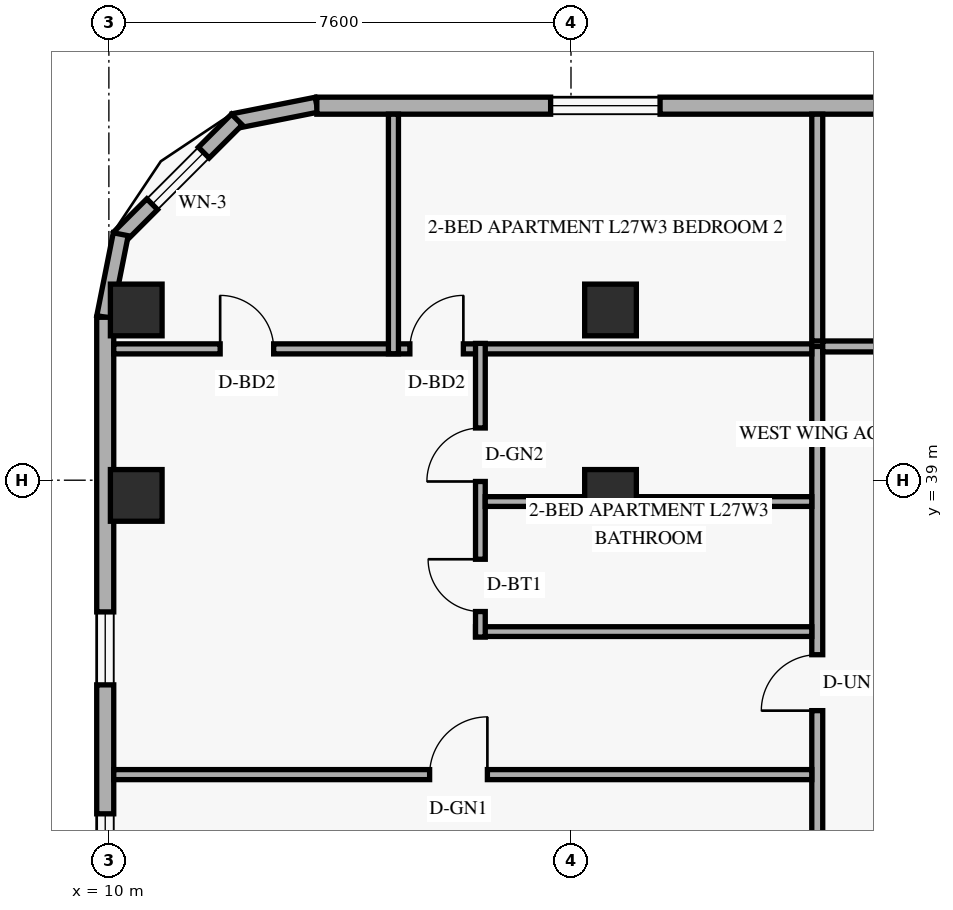
"""IFC4 building model, lengths in metres.
Left out: names, types, materials, properties, quantities, classifications, styles, units other than length and angle.
Written with IfcOpenShell. Run it as: python <this file> out.ifc"""

import sys

from ifc_helpers import new_model, si_unit, direction, frame, frame_2d, origin, origin_2d, place, context, subcontext, project, spatial, rectangle, extrude, element, fill, save


model = new_model("IFC4")
c1 = context("Model", 3, precision=1e-05, world=origin(), true_north=direction((0.0, 1.0)))
c2 = subcontext(c1, "Body", "Model", "MODEL_VIEW")
j1 = project(units=[si_unit("LENGTHUNIT", "METRE"), si_unit("PLANEANGLEUNIT", "RADIAN")], contexts=[c1])
p1 = place(None, origin())
s1 = spatial("IfcSite", under=j1, at=p1, CompositionType="ELEMENT")
p2 = place(p1, origin())
s2 = spatial("IfcBuilding", under=s1, at=p2, CompositionType="ELEMENT")
p3 = place(p2, frame((0.0, 0.0, 106.2)))
s3 = spatial("IfcBuildingStorey", under=s2, at=p3, CompositionType="ELEMENT", Elevation=106.2)
for number, where, z_axis, x_axis in (
    (1, (10.45, 38.75, 0.0), (0.0, 0.0, 1.0), (1.0, 0.0, 0.0)),
    (2, (10.45, 41.8, 0.0), (0.0, 0.0, 1.0), (1.0, 0.0, 0.0)),
    (3, (18.25, 38.75, 0.0), (0.0, 0.0, 1.0), (1.0, 0.0, 0.0)),
    (4, (18.25, 41.8, 0.0), (0.0, 0.0, 1.0), (1.0, 0.0, 0.0)),
):
    element("IfcColumn", number, at=place(p3, frame(where, z_axis=z_axis, x_axis=x_axis)), inside=s3, PredefinedType="COLUMN", context=c2, shape_type="SweptSolid", body=[
        extrude(rectangle(XDim=0.85, YDim=0.85, at=origin_2d()), origin(), (0.0, 0.0, 1.0), 3.6),
    ])
p4 = place(p3, frame((13.417, 45.176, 0.0), z_axis=(0.0, 0.0, 1.0), x_axis=(-0.980809899341, -0.19496651342, 0.0)))
e5 = element("IfcWall", 5, at=p4, inside=s3, PredefinedType="SOLIDWALL", context=c2, shape_type="SweptSolid", body=[
    extrude(rectangle(XDim=1.389, YDim=0.25, at=frame_2d((0.694, 0.0))), origin(), (0.0, 0.0, 1.0), 3.36),
])
p5 = place(p3, frame((12.105, 44.932, 0.0), z_axis=(0.0, 0.0, 1.0), x_axis=(-0.707151344399, -0.707062215165, 0.0)))
e6 = element("IfcWall", 6, at=p5, inside=s3, PredefinedType="SOLIDWALL", context=c2, shape_type="SweptSolid", body=[
    extrude(rectangle(XDim=2.739, YDim=0.25, at=frame_2d((1.37, 0.0))), origin(), (0.0, 0.0, 1.0), 3.36),
])
p6 = place(p5, frame((0.77, 0.0, 0.85)))
e7 = element("IfcOpeningElement", 7, at=p6, cuts=e6, PredefinedType="OPENING", context=c2, shape_type="SweptSolid", body=[
    extrude(rectangle(XDim=1.2, YDim=1.5, at=frame_2d((0.6, 0.75))), frame((0.0, 0.135, 0.0), z_axis=(0.0, -1.0, 0.0), x_axis=(1.0, 0.0, 0.0)), (0.0, 0.0, 1.0), 0.27),
])
p7 = place(p3, frame((10.195, 43.045, 0.0), z_axis=(0.0, 0.0, 1.0), x_axis=(-0.195000137217, -0.980803214965, 0.0)))
e8 = element("IfcWall", 8, at=p7, inside=s3, PredefinedType="SOLIDWALL", context=c2, shape_type="SweptSolid", body=[
    extrude(rectangle(XDim=1.388, YDim=0.25, at=frame_2d((0.694, 0.0))), origin(), (0.0, 0.0, 1.0), 3.36),
])
p8 = place(p3, frame((49.98, 45.16, 0.0), z_axis=(0.0, 0.0, 1.0), x_axis=(-1.0, 0.0, 0.0)))
e9 = element("IfcWall", 9, at=p8, inside=s3, PredefinedType="SOLIDWALL", context=c2, shape_type="SweptSolid", body=[
    extrude(rectangle(XDim=36.56, YDim=0.28, at=frame_2d((18.28, 0.0))), origin(), (0.0, 0.0, 1.0), 3.36),
])
p9 = place(p8, frame((30.915, 0.0, 0.85)))
e10 = element("IfcOpeningElement", 10, at=p9, cuts=e9, PredefinedType="OPENING", context=c2, shape_type="SweptSolid", body=[
    extrude(rectangle(XDim=1.8, YDim=1.6, at=frame_2d((0.9, 0.8))), frame((0.0, 0.15, 0.0), z_axis=(0.0, -1.0, 0.0), x_axis=(1.0, 0.0, 0.0)), (0.0, 0.0, 1.0), 0.3),
])
p10 = place(p8, frame((23.055, 0.0, 0.85)))
e11 = element("IfcOpeningElement", 11, at=p10, cuts=e9, PredefinedType="OPENING", context=c2, shape_type="SweptSolid", body=[
    extrude(rectangle(XDim=1.8, YDim=1.6, at=frame_2d((0.9, 0.8))), frame((0.0, 0.15, 0.0), z_axis=(0.0, -1.0, 0.0), x_axis=(1.0, 0.0, 0.0)), (0.0, 0.0, 1.0), 0.3),
])
p11 = place(p8, frame((16.17, 0.0, 0.85)))
e12 = element("IfcOpeningElement", 12, at=p11, cuts=e9, PredefinedType="OPENING", context=c2, shape_type="SweptSolid", body=[
    extrude(rectangle(XDim=1.8, YDim=1.6, at=frame_2d((0.9, 0.8))), frame((0.0, 0.15, 0.0), z_axis=(0.0, -1.0, 0.0), x_axis=(1.0, 0.0, 0.0)), (0.0, 0.0, 1.0), 0.3),
])
p12 = place(p8, frame((10.565, 0.0, 0.85)))
e13 = element("IfcOpeningElement", 13, at=p12, cuts=e9, PredefinedType="OPENING", context=c2, shape_type="SweptSolid", body=[
    extrude(rectangle(XDim=1.8, YDim=1.6, at=frame_2d((0.9, 0.8))), frame((0.0, 0.15, 0.0), z_axis=(0.0, -1.0, 0.0), x_axis=(1.0, 0.0, 0.0)), (0.0, 0.0, 1.0), 0.3),
])
p13 = place(p8, frame((5.475, 0.0, 0.85)))
e14 = element("IfcOpeningElement", 14, at=p13, cuts=e9, PredefinedType="OPENING", context=c2, shape_type="SweptSolid", body=[
    extrude(rectangle(XDim=1.8, YDim=1.6, at=frame_2d((0.9, 0.8))), frame((0.0, 0.15, 0.0), z_axis=(0.0, -1.0, 0.0), x_axis=(1.0, 0.0, 0.0)), (0.0, 0.0, 1.0), 0.3),
])
p14 = place(p8, frame((2.88, 0.0, 0.85)))
e15 = element("IfcOpeningElement", 15, at=p14, cuts=e9, PredefinedType="OPENING", context=c2, shape_type="SweptSolid", body=[
    extrude(rectangle(XDim=1.2, YDim=1.5, at=frame_2d((0.6, 0.75))), frame((0.0, 0.15, 0.0), z_axis=(0.0, -1.0, 0.0), x_axis=(1.0, 0.0, 0.0)), (0.0, 0.0, 1.0), 0.3),
])
p15 = place(p8, frame((0.39, 0.0, 0.85)))
e16 = element("IfcOpeningElement", 16, at=p15, cuts=e9, PredefinedType="OPENING", context=c2, shape_type="SweptSolid", body=[
    extrude(rectangle(XDim=1.8, YDim=1.6, at=frame_2d((0.9, 0.8))), frame((0.0, 0.15, 0.0), z_axis=(0.0, -1.0, 0.0), x_axis=(1.0, 0.0, 0.0)), (0.0, 0.0, 1.0), 0.3),
])
p16 = place(p3, frame((9.94, 41.68, 0.0), z_axis=(0.0, 0.0, 1.0), x_axis=(0.0, -1.0, 0.0)))
e17 = element("IfcWall", 17, at=p16, inside=s3, PredefinedType="SOLIDWALL", context=c2, shape_type="SweptSolid", body=[
    extrude(rectangle(XDim=35.36, YDim=0.28, at=frame_2d((17.68, 0.0))), origin(), (0.0, 0.0, 1.0), 3.36),
])
p17 = place(p16, frame((28.991, 0.0, 0.85)))
e18 = element("IfcOpeningElement", 18, at=p17, cuts=e17, PredefinedType="OPENING", context=c2, shape_type="SweptSolid", body=[
    extrude(rectangle(XDim=1.2, YDim=1.5, at=frame_2d((0.6, 0.75))), frame((0.0, 0.15, 0.0), z_axis=(0.0, -1.0, 0.0), x_axis=(1.0, 0.0, 0.0)), (0.0, 0.0, 1.0), 0.3),
])
p18 = place(p16, frame((25.281, 0.0, 0.85)))
e19 = element("IfcOpeningElement", 19, at=p18, cuts=e17, PredefinedType="OPENING", context=c2, shape_type="SweptSolid", body=[
    extrude(rectangle(XDim=1.2, YDim=1.5, at=frame_2d((0.6, 0.75))), frame((0.0, 0.15, 0.0), z_axis=(0.0, -1.0, 0.0), x_axis=(1.0, 0.0, 0.0)), (0.0, 0.0, 1.0), 0.3),
])
p19 = place(p16, frame((20.548, 0.0, 0.85)))
e20 = element("IfcOpeningElement", 20, at=p19, cuts=e17, PredefinedType="OPENING", context=c2, shape_type="SweptSolid", body=[
    extrude(rectangle(XDim=1.2, YDim=1.5, at=frame_2d((0.6, 0.75))), frame((0.0, 0.15, 0.0), z_axis=(0.0, -1.0, 0.0), x_axis=(1.0, 0.0, 0.0)), (0.0, 0.0, 1.0), 0.3),
])
p20 = place(p16, frame((14.663, 0.0, 0.85)))
e21 = element("IfcOpeningElement", 21, at=p20, cuts=e17, PredefinedType="OPENING", context=c2, shape_type="SweptSolid", body=[
    extrude(rectangle(XDim=1.2, YDim=1.5, at=frame_2d((0.6, 0.75))), frame((0.0, 0.15, 0.0), z_axis=(0.0, -1.0, 0.0), x_axis=(1.0, 0.0, 0.0)), (0.0, 0.0, 1.0), 0.3),
])
p21 = place(p16, frame((8.167, 0.0, 0.85)))
e22 = element("IfcOpeningElement", 22, at=p21, cuts=e17, PredefinedType="OPENING", context=c2, shape_type="SweptSolid", body=[
    extrude(rectangle(XDim=1.2, YDim=1.5, at=frame_2d((0.6, 0.75))), frame((0.0, 0.15, 0.0), z_axis=(0.0, -1.0, 0.0), x_axis=(1.0, 0.0, 0.0)), (0.0, 0.0, 1.0), 0.3),
])
p22 = place(p16, frame((4.846, 0.0, 0.85)))
e23 = element("IfcOpeningElement", 23, at=p22, cuts=e17, PredefinedType="OPENING", context=c2, shape_type="SweptSolid", body=[
    extrude(rectangle(XDim=1.2, YDim=1.5, at=frame_2d((0.6, 0.75))), frame((0.0, 0.15, 0.0), z_axis=(0.0, -1.0, 0.0), x_axis=(1.0, 0.0, 0.0)), (0.0, 0.0, 1.0), 0.3),
])
p23 = place(p3, frame((21.65, 6.8, 0.0), z_axis=(0.0, 0.0, 1.0), x_axis=(0.0, 1.0, 0.0)))
e24 = element("IfcWall", 24, at=p23, inside=s3, PredefinedType="STANDARD", context=c2, shape_type="SweptSolid", body=[
    extrude(rectangle(XDim=34.4, YDim=0.18, at=frame_2d((17.2, 0.0))), origin(), (0.0, 0.0, 1.0), 2.731),
])
p24 = place(p23, frame((4.785, 0.0, 0.0)))
e25 = element("IfcOpeningElement", 25, at=p24, cuts=e24, PredefinedType="OPENING", context=c2, shape_type="SweptSolid", body=[
    extrude(rectangle(XDim=0.92, YDim=2.15, at=frame_2d((0.46, 1.075))), frame((0.0, 0.1, 0.0), z_axis=(0.0, -1.0, 0.0), x_axis=(1.0, 0.0, 0.0)), (0.0, 0.0, 1.0), 0.2),
])
p25 = place(p23, frame((15.384, 0.0, 0.0)))
e26 = element("IfcOpeningElement", 26, at=p25, cuts=e24, PredefinedType="OPENING", context=c2, shape_type="SweptSolid", body=[
    extrude(rectangle(XDim=0.92, YDim=2.15, at=frame_2d((0.46, 1.075))), frame((0.0, 0.1, 0.0), z_axis=(0.0, -1.0, 0.0), x_axis=(1.0, 0.0, 0.0)), (0.0, 0.0, 1.0), 0.2),
])
p26 = place(p23, frame((28.41, 0.0, 0.0)))
e27 = element("IfcOpeningElement", 27, at=p26, cuts=e24, PredefinedType="OPENING", context=c2, shape_type="SweptSolid", body=[
    extrude(rectangle(XDim=0.92, YDim=2.15, at=frame_2d((0.46, 1.075))), frame((0.0, 0.1, 0.0), z_axis=(0.0, -1.0, 0.0), x_axis=(1.0, 0.0, 0.0)), (0.0, 0.0, 1.0), 0.2),
])
p27 = place(p3, frame((21.74, 41.2, 0.0), z_axis=(0.0, 0.0, 1.0), x_axis=(1.0, 0.0, 0.0)))
e28 = element("IfcWall", 28, at=p27, inside=s3, PredefinedType="STANDARD", context=c2, shape_type="SweptSolid", body=[
    extrude(rectangle(XDim=13.68, YDim=0.18, at=frame_2d((6.84, 0.0))), origin(), (0.0, 0.0, 1.0), 2.731),
])
p28 = place(p27, frame((3.09, 0.0, 0.0)))
e29 = element("IfcOpeningElement", 29, at=p28, cuts=e28, PredefinedType="OPENING", context=c2, shape_type="SweptSolid", body=[
    extrude(rectangle(XDim=0.95, YDim=2.15, at=frame_2d((0.475, 1.075))), frame((0.0, 0.1, 0.0), z_axis=(0.0, -1.0, 0.0), x_axis=(1.0, 0.0, 0.0)), (0.0, 0.0, 1.0), 0.2),
])
p29 = place(p27, frame((10.11, 0.0, 0.0)))
e30 = element("IfcOpeningElement", 30, at=p29, cuts=e28, PredefinedType="OPENING", context=c2, shape_type="SweptSolid", body=[
    extrude(rectangle(XDim=0.95, YDim=2.15, at=frame_2d((0.475, 1.075))), frame((0.0, 0.1, 0.0), z_axis=(0.0, -1.0, 0.0), x_axis=(1.0, 0.0, 0.0)), (0.0, 0.0, 1.0), 0.2),
])
p30 = place(p3, frame((21.65, 41.29, 0.0), z_axis=(0.0, 0.0, 1.0), x_axis=(0.0, 1.0, 0.0)))
e31 = element("IfcWall", 31, at=p30, inside=s3, PredefinedType="PARTITIONING", context=c2, shape_type="SweptSolid", body=[
    extrude(rectangle(XDim=3.73, YDim=0.18, at=frame_2d((1.865, 0.0))), origin(), (0.0, 0.0, 1.0), 2.809),
])
p31 = place(p3, frame((10.08, 41.16, 0.0), z_axis=(0.0, 0.0, 1.0), x_axis=(1.0, 0.0, 0.0)))
e32 = element("IfcWall", 32, at=p31, inside=s3, PredefinedType="PARTITIONING", context=c2, shape_type="SweptSolid", body=[
    extrude(rectangle(XDim=11.48, YDim=0.165, at=frame_2d((5.74, 0.0))), origin(), (0.0, 0.0, 1.0), 2.731),
])
p32 = place(p31, frame((1.75, 0.0, 0.0)))
e33 = element("IfcOpeningElement", 33, at=p32, cuts=e32, PredefinedType="OPENING", context=c2, shape_type="SweptSolid", body=[
    extrude(rectangle(XDim=0.88, YDim=2.14, at=frame_2d((0.44, 1.07))), frame((0.0, 0.093, 0.0), z_axis=(0.0, -1.0, 0.0), x_axis=(1.0, 0.0, 0.0)), (0.0, 0.0, 1.0), 0.185),
])
p33 = place(p31, frame((4.87, 0.0, 0.0)))
e34 = element("IfcOpeningElement", 34, at=p33, cuts=e32, PredefinedType="OPENING", context=c2, shape_type="SweptSolid", body=[
    extrude(rectangle(XDim=0.88, YDim=2.14, at=frame_2d((0.44, 1.07))), frame((0.0, 0.093, 0.0), z_axis=(0.0, -1.0, 0.0), x_axis=(1.0, 0.0, 0.0)), (0.0, 0.0, 1.0), 0.185),
])
p34 = place(p3, frame((16.03, 36.51, 0.0), z_axis=(0.0, 0.0, 1.0), x_axis=(1.0, 0.0, 0.0)))
e35 = element("IfcWall", 35, at=p34, inside=s3, PredefinedType="PLUMBINGWALL", context=c2, shape_type="SweptSolid", body=[
    extrude(rectangle(XDim=5.53, YDim=0.16, at=frame_2d((2.765, 0.0))), origin(), (0.0, 0.0, 1.0), 2.731),
])
p35 = place(p3, frame((16.11, 36.42, 0.0), z_axis=(0.0, 0.0, 1.0), x_axis=(0.0, 1.0, 0.0)))
e36 = element("IfcWall", 36, at=p35, inside=s3, PredefinedType="PLUMBINGWALL", context=c2, shape_type="SweptSolid", body=[
    extrude(rectangle(XDim=4.83, YDim=0.16, at=frame_2d((2.415, 0.0))), origin(), (0.0, 0.0, 1.0), 2.731),
])
p36 = place(p35, frame((0.42, 0.0, 0.0)))
e37 = element("IfcOpeningElement", 37, at=p36, cuts=e36, PredefinedType="OPENING", context=c2, shape_type="SweptSolid", body=[
    extrude(rectangle(XDim=0.86, YDim=2.12, at=frame_2d((0.43, 1.06))), frame((0.0, 0.09, 0.0), z_axis=(0.0, -1.0, 0.0), x_axis=(1.0, 0.0, 0.0)), (0.0, 0.0, 1.0), 0.18),
])
p37 = place(p35, frame((2.559, 0.0, 0.0)))
e38 = element("IfcOpeningElement", 38, at=p37, cuts=e36, PredefinedType="OPENING", context=c2, shape_type="SweptSolid", body=[
    extrude(rectangle(XDim=0.88, YDim=2.12, at=frame_2d((0.44, 1.06))), frame((0.0, 0.09, 0.0), z_axis=(0.0, -1.0, 0.0), x_axis=(1.0, 0.0, 0.0)), (0.0, 0.0, 1.0), 0.18),
])
p38 = place(p3, frame((16.19, 38.649, 0.0), z_axis=(0.0, 0.0, 1.0), x_axis=(1.0, 0.0, 0.0)))
e39 = element("IfcWall", 39, at=p38, inside=s3, PredefinedType="PLUMBINGWALL", context=c2, shape_type="SweptSolid", body=[
    extrude(rectangle(XDim=5.37, YDim=0.16, at=frame_2d((2.685, 0.0))), origin(), (0.0, 0.0, 1.0), 2.731),
])
p39 = place(p3, frame((10.08, 34.158, 0.0), z_axis=(0.0, 0.0, 1.0), x_axis=(1.0, 0.0, 0.0)))
e40 = element("IfcWall", 40, at=p39, inside=s3, PredefinedType="PARTITIONING", context=c2, shape_type="SweptSolid", body=[
    extrude(rectangle(XDim=11.48, YDim=0.165, at=frame_2d((5.74, 0.0))), origin(), (0.0, 0.0, 1.0), 2.731),
])
p40 = place(p39, frame((5.195, 0.0, 0.0)))
e41 = element("IfcOpeningElement", 41, at=p40, cuts=e40, PredefinedType="OPENING", context=c2, shape_type="SweptSolid", body=[
    extrude(rectangle(XDim=0.95, YDim=2.15, at=frame_2d((0.475, 1.075))), frame((0.0, 0.093, 0.0), z_axis=(0.0, -1.0, 0.0), x_axis=(1.0, 0.0, 0.0)), (0.0, 0.0, 1.0), 0.185),
])
p41 = place(p3, frame((14.68, 41.08, 0.0), z_axis=(0.0, 0.0, 1.0), x_axis=(0.0, 1.0, 0.0)))
e42 = element("IfcWall", 42, at=p41, inside=s3, PredefinedType="PARTITIONING", context=c2, shape_type="SweptSolid", body=[
    extrude(rectangle(XDim=3.94, YDim=0.165, at=frame_2d((1.97, 0.0))), origin(), (0.0, 0.0, 1.0), 2.809),
])
p42 = place(p6, origin())
e43 = element("IfcWindow", 43, at=p42, inside=s3, PartitioningType="SINGLE_PANEL", PredefinedType="WINDOW", context=c2, shape_type="SweptSolid", body=[
    extrude(rectangle(XDim=1.2, YDim=1.5, at=frame_2d((0.6, 0.75))), frame((0.0, 0.03, 0.0), z_axis=(0.0, -1.0, 0.0), x_axis=(1.0, 0.0, 0.0)), (0.0, 0.0, 1.0), 0.06),
])
fill(e7, e43)
p43 = place(p9, origin())
e44 = element("IfcWindow", 44, at=p43, inside=s3, PartitioningType="SINGLE_PANEL", PredefinedType="WINDOW", context=c2, shape_type="SweptSolid", body=[
    extrude(rectangle(XDim=1.8, YDim=1.6, at=frame_2d((0.9, 0.8))), frame((0.0, 0.03, 0.0), z_axis=(0.0, -1.0, 0.0), x_axis=(1.0, 0.0, 0.0)), (0.0, 0.0, 1.0), 0.06),
])
fill(e10, e44)
p44 = place(p21, origin())
e45 = element("IfcWindow", 45, at=p44, inside=s3, PartitioningType="SINGLE_PANEL", PredefinedType="WINDOW", context=c2, shape_type="SweptSolid", body=[
    extrude(rectangle(XDim=1.2, YDim=1.5, at=frame_2d((0.6, 0.75))), frame((0.0, 0.03, 0.0), z_axis=(0.0, -1.0, 0.0), x_axis=(1.0, 0.0, 0.0)), (0.0, 0.0, 1.0), 0.06),
])
fill(e22, e45)
p45 = place(p22, origin())
e46 = element("IfcWindow", 46, at=p45, inside=s3, PartitioningType="SINGLE_PANEL", PredefinedType="WINDOW", context=c2, shape_type="SweptSolid", body=[
    extrude(rectangle(XDim=1.2, YDim=1.5, at=frame_2d((0.6, 0.75))), frame((0.0, 0.03, 0.0), z_axis=(0.0, -1.0, 0.0), x_axis=(1.0, 0.0, 0.0)), (0.0, 0.0, 1.0), 0.06),
])
fill(e23, e46)
p46 = place(p40, origin())
e47 = element("IfcDoor", 47, at=p46, inside=s3, OperationType="SINGLE_SWING_RIGHT", PredefinedType="DOOR", context=c2, shape_type="SweptSolid", body=[
    extrude(rectangle(XDim=0.95, YDim=2.15, at=frame_2d((0.475, 1.075))), frame((0.0, 0.025, 0.0), z_axis=(0.0, -1.0, 0.0), x_axis=(1.0, 0.0, 0.0)), (0.0, 0.0, 1.0), 0.05),
])
fill(e41, e47)
p47 = place(p26, origin())
e48 = element("IfcDoor", 48, at=p47, inside=s3, OperationType="SINGLE_SWING_LEFT", PredefinedType="DOOR", context=c2, shape_type="SweptSolid", body=[
    extrude(rectangle(XDim=0.92, YDim=2.15, at=frame_2d((0.46, 1.075))), frame((0.0, 0.025, 0.0), z_axis=(0.0, -1.0, 0.0), x_axis=(1.0, 0.0, 0.0)), (0.0, 0.0, 1.0), 0.05),
])
fill(e27, e48)
p48 = place(p36, origin())
e49 = element("IfcDoor", 49, at=p48, inside=s3, OperationType="SINGLE_SWING_RIGHT", PredefinedType="DOOR", context=c2, shape_type="SweptSolid", body=[
    extrude(rectangle(XDim=0.86, YDim=2.12, at=frame_2d((0.43, 1.06))), frame((0.0, 0.025, 0.0), z_axis=(0.0, -1.0, 0.0), x_axis=(1.0, 0.0, 0.0)), (0.0, 0.0, 1.0), 0.05),
])
fill(e37, e49)
p49 = place(p37, origin())
e50 = element("IfcDoor", 50, at=p49, inside=s3, OperationType="SINGLE_SWING_LEFT", PredefinedType="DOOR", context=c2, shape_type="SweptSolid", body=[
    extrude(rectangle(XDim=0.88, YDim=2.12, at=frame_2d((0.44, 1.06))), frame((0.0, 0.025, 0.0), z_axis=(0.0, -1.0, 0.0), x_axis=(1.0, 0.0, 0.0)), (0.0, 0.0, 1.0), 0.05),
])
fill(e38, e50)
p50 = place(p32, origin())
e51 = element("IfcDoor", 51, at=p50, inside=s3, OperationType="SINGLE_SWING_LEFT", PredefinedType="DOOR", context=c2, shape_type="SweptSolid", body=[
    extrude(rectangle(XDim=0.88, YDim=2.14, at=frame_2d((0.44, 1.07))), frame((0.0, 0.025, 0.0), z_axis=(0.0, -1.0, 0.0), x_axis=(1.0, 0.0, 0.0)), (0.0, 0.0, 1.0), 0.05),
])
fill(e33, e51)
p51 = place(p33, origin())
e52 = element("IfcDoor", 52, at=p51, inside=s3, OperationType="SINGLE_SWING_RIGHT", PredefinedType="DOOR", context=c2, shape_type="SweptSolid", body=[
    extrude(rectangle(XDim=0.88, YDim=2.14, at=frame_2d((0.44, 1.07))), frame((0.0, 0.025, 0.0), z_axis=(0.0, -1.0, 0.0), x_axis=(1.0, 0.0, 0.0)), (0.0, 0.0, 1.0), 0.05),
])
fill(e34, e52)
save(model, sys.argv[1])
